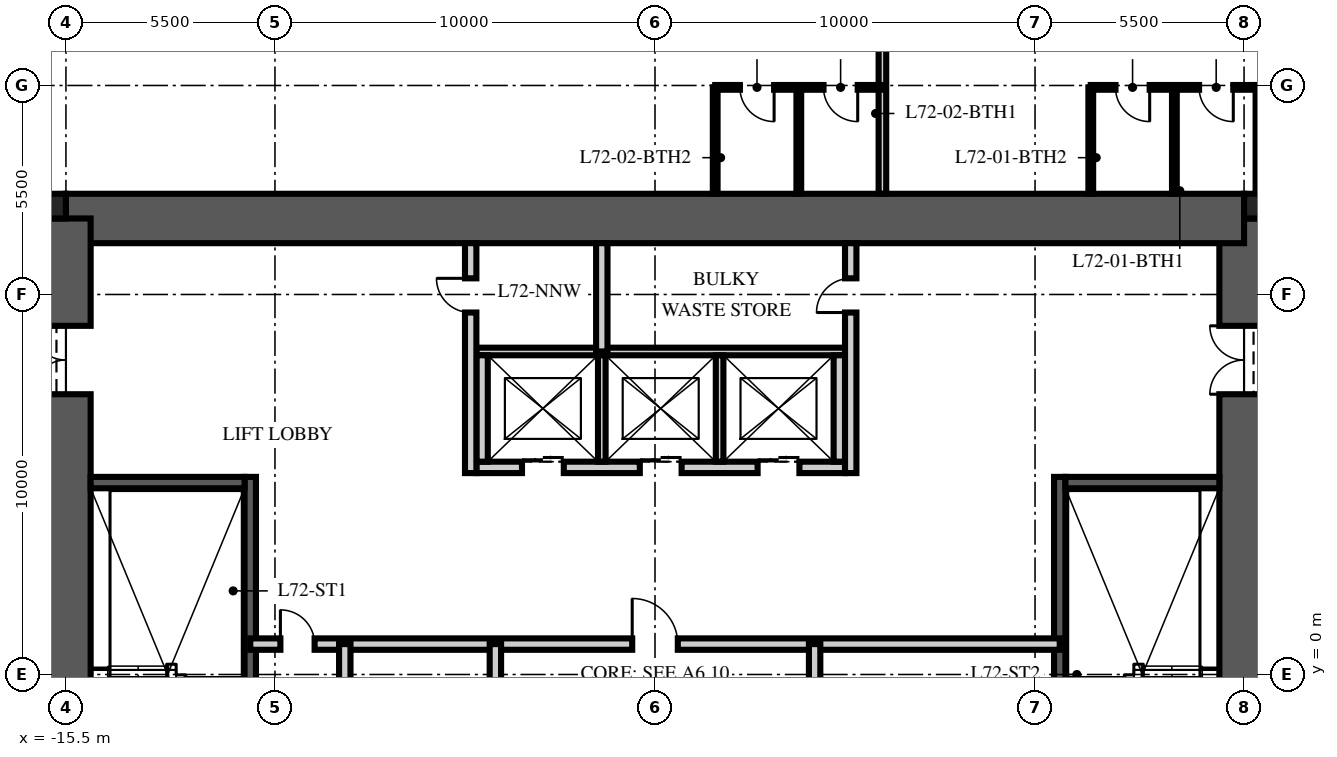
"""IFC4 building model, lengths in metres.
Left out: names, types, materials, properties, quantities, classifications, styles, units other than length and angle.
Written with IfcOpenShell. Run it as: python <this file> out.ifc"""

import sys

from ifc_helpers import new_model, si_unit, direction, frame, frame_2d, origin, origin_2d, place, context, subcontext, project, spatial, rectangle, extrude, element, fill, save


model = new_model("IFC4")
c1 = context("Model", 3, precision=1e-05, world=origin(), true_north=direction((0.0, 1.0)))
c2 = subcontext(c1, "Body", "Model", "MODEL_VIEW")
j1 = project(units=[si_unit("LENGTHUNIT", "METRE"), si_unit("PLANEANGLEUNIT", "RADIAN")], contexts=[c1])
p1 = place(None, origin())
s1 = spatial("IfcSite", under=j1, at=p1, CompositionType="ELEMENT")
p2 = place(p1, origin())
s2 = spatial("IfcBuilding", under=s1, at=p2, CompositionType="ELEMENT")
p3 = place(p2, frame((0.0, 0.0, 289.5)))
s3 = spatial("IfcBuildingStorey", under=s2, at=p3, CompositionType="ELEMENT", Elevation=289.5)
p4 = place(p3, frame((15.5, -12.0, -0.25), z_axis=(0.0, 0.0, 1.0), x_axis=(0.0, 1.0, 0.0)))
e1 = element("IfcWall", 1, at=p4, inside=s3, PredefinedType="SHEAR", context=c2, shape_type="SweptSolid", body=[
    extrude(rectangle(XDim=24.0, YDim=1.3, at=frame_2d((12.0, 0.0))), origin(), (0.0, 0.0, 1.0), 3.75),
])
p5 = place(p4, frame((3.125, 0.0, 0.25)))
e2 = element("IfcOpeningElement", 2, at=p5, cuts=e1, PredefinedType="OPENING", context=c2, shape_type="SweptSolid", body=[
    extrude(rectangle(XDim=1.2, YDim=2.1, at=frame_2d((0.6, 1.05))), frame((0.0, 0.66, 0.0), z_axis=(0.0, -1.0, 0.0), x_axis=(1.0, 0.0, 0.0)), (0.0, 0.0, 1.0), 1.32),
])
p6 = place(p4, frame((19.375, 0.0, 0.25)))
e3 = element("IfcOpeningElement", 3, at=p6, cuts=e1, PredefinedType="OPENING", context=c2, shape_type="SweptSolid", body=[
    extrude(rectangle(XDim=1.8, YDim=2.1, at=frame_2d((0.9, 1.05))), frame((0.0, 0.66, 0.0), z_axis=(0.0, -1.0, 0.0), x_axis=(1.0, 0.0, 0.0)), (0.0, 0.0, 1.0), 1.32),
])
p7 = place(p3, frame((-15.5, 12.0, -0.25), z_axis=(0.0, 0.0, 1.0), x_axis=(1.0, 0.0, 0.0)))
e4 = element("IfcWall", 4, at=p7, inside=s3, PredefinedType="SHEAR", context=c2, shape_type="SweptSolid", body=[
    extrude(rectangle(XDim=31.0, YDim=1.3, at=frame_2d((15.5, 0.0))), origin(), (0.0, 0.0, 1.0), 3.75),
])
p8 = place(p3, frame((-15.5, -12.0, -0.25), z_axis=(0.0, 0.0, 1.0), x_axis=(0.0, 1.0, 0.0)))
e5 = element("IfcWall", 5, at=p8, inside=s3, PredefinedType="SHEAR", context=c2, shape_type="SweptSolid", body=[
    extrude(rectangle(XDim=24.0, YDim=1.3, at=frame_2d((12.0, 0.0))), origin(), (0.0, 0.0, 1.0), 3.75),
])
p9 = place(p8, frame((3.125, 0.0, 0.25)))
e6 = element("IfcOpeningElement", 6, at=p9, cuts=e5, PredefinedType="OPENING", context=c2, shape_type="SweptSolid", body=[
    extrude(rectangle(XDim=1.2, YDim=2.1, at=frame_2d((0.6, 1.05))), frame((0.0, 0.66, 0.0), z_axis=(0.0, -1.0, 0.0), x_axis=(1.0, 0.0, 0.0)), (0.0, 0.0, 1.0), 1.32),
])
p10 = place(p8, frame((19.375, 0.0, 0.25)))
e7 = element("IfcOpeningElement", 7, at=p10, cuts=e5, PredefinedType="OPENING", context=c2, shape_type="SweptSolid", body=[
    extrude(rectangle(XDim=1.8, YDim=2.1, at=frame_2d((0.9, 1.05))), frame((0.0, 0.66, 0.0), z_axis=(0.0, -1.0, 0.0), x_axis=(1.0, 0.0, 0.0)), (0.0, 0.0, 1.0), 1.32),
])
for number, where, z_axis, x_axis in (
    (8, (15.825, 12.325, -0.25), (0.0, 0.0, 1.0), (1.0, 0.0, 0.0)),
    (9, (-15.825, 12.325, -0.25), (0.0, 0.0, 1.0), (1.0, 0.0, 0.0)),
):
    element("IfcColumn", number, at=place(p3, frame(where, z_axis=z_axis, x_axis=x_axis)), inside=s3, PredefinedType="COLUMN", context=c2, shape_type="SweptSolid", body=[
        extrude(rectangle(XDim=0.65, YDim=0.65, at=origin_2d()), origin(), (0.0, 0.0, 1.0), 3.75),
    ])
p11 = place(p3, frame((-10.65, -4.9, 0.0), z_axis=(0.0, 0.0, 1.0), x_axis=(0.0, 1.0, 0.0)))
e10 = element("IfcWall", 10, at=p11, inside=s3, PredefinedType="SOLIDWALL", context=c2, shape_type="SweptSolid", body=[
    extrude(rectangle(XDim=10.1, YDim=0.3, at=frame_2d((5.05, 0.0))), origin(), (0.0, 0.0, 1.0), 3.5),
])
p12 = place(p3, frame((-14.85, 5.05, 0.0), z_axis=(0.0, 0.0, 1.0), x_axis=(1.0, 0.0, 0.0)))
e11 = element("IfcWall", 11, at=p12, inside=s3, PredefinedType="SOLIDWALL", context=c2, shape_type="SweptSolid", body=[
    extrude(rectangle(XDim=4.05, YDim=0.3, at=frame_2d((2.025, 0.0))), origin(), (0.0, 0.0, 1.0), 3.5),
])
p13 = place(p3, frame((10.65, -4.9, 0.0), z_axis=(0.0, 0.0, 1.0), x_axis=(0.0, 1.0, 0.0)))
e12 = element("IfcWall", 12, at=p13, inside=s3, PredefinedType="SOLIDWALL", context=c2, shape_type="SweptSolid", body=[
    extrude(rectangle(XDim=10.1, YDim=0.3, at=frame_2d((5.05, 0.0))), origin(), (0.0, 0.0, 1.0), 3.5),
])
p14 = place(p3, frame((14.85, 5.05, 0.0), z_axis=(0.0, 0.0, 1.0), x_axis=(-1.0, 0.0, 0.0)))
e13 = element("IfcWall", 13, at=p14, inside=s3, PredefinedType="SOLIDWALL", context=c2, shape_type="SweptSolid", body=[
    extrude(rectangle(XDim=4.05, YDim=0.3, at=frame_2d((2.025, 0.0))), origin(), (0.0, 0.0, 1.0), 3.5),
])
p15 = place(p3, frame((-4.7, 5.45, 0.0), z_axis=(0.0, 0.0, 1.0), x_axis=(1.0, 0.0, 0.0)))
e14 = element("IfcWall", 14, at=p15, inside=s3, PredefinedType="PARTITIONING", context=c2, shape_type="SweptSolid", body=[
    extrude(rectangle(XDim=9.7, YDim=0.3, at=frame_2d((4.85, 0.0))), origin(), (0.0, 0.0, 1.0), 3.5),
])
p16 = place(p15, frame((1.2, 0.0, 0.0)))
e15 = element("IfcOpeningElement", 15, at=p16, cuts=e14, PredefinedType="OPENING", context=c2, shape_type="SweptSolid", body=[
    extrude(rectangle(XDim=1.1, YDim=2.1, at=frame_2d((0.55, 1.05))), frame((0.0, 0.16, 0.0), z_axis=(0.0, -1.0, 0.0), x_axis=(1.0, 0.0, 0.0)), (0.0, 0.0, 1.0), 0.32),
])
p17 = place(p15, frame((4.3, 0.0, 0.0)))
e16 = element("IfcOpeningElement", 16, at=p17, cuts=e14, PredefinedType="OPENING", context=c2, shape_type="SweptSolid", body=[
    extrude(rectangle(XDim=1.1, YDim=2.1, at=frame_2d((0.55, 1.05))), frame((0.0, 0.16, 0.0), z_axis=(0.0, -1.0, 0.0), x_axis=(1.0, 0.0, 0.0)), (0.0, 0.0, 1.0), 0.32),
])
p18 = place(p15, frame((7.4, 0.0, 0.0)))
e17 = element("IfcOpeningElement", 17, at=p18, cuts=e14, PredefinedType="OPENING", context=c2, shape_type="SweptSolid", body=[
    extrude(rectangle(XDim=1.1, YDim=2.1, at=frame_2d((0.55, 1.05))), frame((0.0, 0.16, 0.0), z_axis=(0.0, -1.0, 0.0), x_axis=(1.0, 0.0, 0.0)), (0.0, 0.0, 1.0), 0.32),
])
p19 = place(p3, frame((-4.7, 8.5, 0.0), z_axis=(0.0, 0.0, 1.0), x_axis=(1.0, 0.0, 0.0)))
e18 = element("IfcWall", 18, at=p19, inside=s3, PredefinedType="PARTITIONING", context=c2, shape_type="SweptSolid", body=[
    extrude(rectangle(XDim=9.7, YDim=0.2, at=frame_2d((4.85, 0.0))), origin(), (0.0, 0.0, 1.0), 3.5),
])
for number, where, z_axis, x_axis in (
    (19, (-4.55, 5.6, 0.0), (0.0, 0.0, 1.0), (0.0, 1.0, 0.0)),
    (20, (4.85, 5.6, 0.0), (0.0, 0.0, 1.0), (0.0, 1.0, 0.0)),
):
    element("IfcWall", number, at=place(p3, frame(where, z_axis=z_axis, x_axis=x_axis)), inside=s3, PredefinedType="PARTITIONING", context=c2, shape_type="SweptSolid", body=[
        extrude(rectangle(XDim=2.8, YDim=0.3, at=frame_2d((1.4, 0.0))), origin(), (0.0, 0.0, 1.0), 3.5),
    ])
for number, where, z_axis, x_axis in (
    (21, (-1.4, 5.6, 0.0), (0.0, 0.0, 1.0), (0.0, 1.0, 0.0)),
    (22, (1.7, 5.6, 0.0), (0.0, 0.0, 1.0), (0.0, 1.0, 0.0)),
):
    element("IfcWall", number, at=place(p3, frame(where, z_axis=z_axis, x_axis=x_axis)), inside=s3, PredefinedType="PARTITIONING", context=c2, shape_type="SweptSolid", body=[
        extrude(rectangle(XDim=2.8, YDim=0.2, at=frame_2d((1.4, 0.0))), origin(), (0.0, 0.0, 1.0), 3.5),
    ])
p20 = place(p3, frame((-10.65, 0.8, 0.0), z_axis=(0.0, 0.0, 1.0), x_axis=(1.0, 0.0, 0.0)))
e23 = element("IfcWall", 23, at=p20, inside=s3, PredefinedType="PARTITIONING", context=c2, shape_type="SweptSolid", body=[
    extrude(rectangle(XDim=21.3, YDim=0.3, at=frame_2d((10.65, 0.0))), origin(), (0.0, 0.0, 1.0), 3.5),
])
p21 = place(p20, frame((10.05, 0.0, 0.0)))
e24 = element("IfcOpeningElement", 24, at=p21, cuts=e23, PredefinedType="OPENING", context=c2, shape_type="SweptSolid", body=[
    extrude(rectangle(XDim=1.2, YDim=2.1, at=frame_2d((0.6, 1.05))), frame((0.0, 0.16, 0.0), z_axis=(0.0, -1.0, 0.0), x_axis=(1.0, 0.0, 0.0)), (0.0, 0.0, 1.0), 0.32),
])
p22 = place(p20, frame((0.793, 0.0, 0.0)))
e25 = element("IfcOpeningElement", 25, at=p22, cuts=e23, PredefinedType="OPENING", context=c2, shape_type="SweptSolid", body=[
    extrude(rectangle(XDim=0.9, YDim=2.1, at=frame_2d((0.45, 1.05))), frame((0.0, 0.16, 0.0), z_axis=(0.0, -1.0, 0.0), x_axis=(1.0, 0.0, 0.0)), (0.0, 0.0, 1.0), 0.32),
])
p23 = place(p3, frame((-4.2, -6.65, 0.0), z_axis=(0.0, 0.0, 1.0), x_axis=(0.0, 1.0, 0.0)))
e26 = element("IfcWall", 26, at=p23, inside=s3, PredefinedType="PARTITIONING", context=c2, shape_type="SweptSolid", body=[
    extrude(rectangle(XDim=7.45, YDim=0.3, at=frame_2d((3.725, 0.0))), origin(), (0.0, 0.0, 1.0), 3.5),
])
p24 = place(p23, frame((3.275, 0.0, 0.0)))
e27 = element("IfcOpeningElement", 27, at=p24, cuts=e26, PredefinedType="OPENING", context=c2, shape_type="SweptSolid", body=[
    extrude(rectangle(XDim=0.9, YDim=2.1, at=frame_2d((0.45, 1.05))), frame((0.0, 0.16, 0.0), z_axis=(0.0, -1.0, 0.0), x_axis=(1.0, 0.0, 0.0)), (0.0, 0.0, 1.0), 0.32),
])
p25 = place(p3, frame((4.2, -6.65, 0.0), z_axis=(0.0, 0.0, 1.0), x_axis=(0.0, 1.0, 0.0)))
e28 = element("IfcWall", 28, at=p25, inside=s3, PredefinedType="PARTITIONING", context=c2, shape_type="SweptSolid", body=[
    extrude(rectangle(XDim=7.45, YDim=0.3, at=frame_2d((3.725, 0.0))), origin(), (0.0, 0.0, 1.0), 3.5),
])
p26 = place(p25, frame((0.866, 0.0, 0.0)))
e29 = element("IfcOpeningElement", 29, at=p26, cuts=e28, PredefinedType="OPENING", context=c2, shape_type="SweptSolid", body=[
    extrude(rectangle(XDim=0.9, YDim=2.1, at=frame_2d((0.45, 1.05))), frame((0.0, 0.16, 0.0), z_axis=(0.0, -1.0, 0.0), x_axis=(1.0, 0.0, 0.0)), (0.0, 0.0, 1.0), 0.32),
])
p27 = place(p25, frame((4.591, 0.0, 0.0)))
e30 = element("IfcOpeningElement", 30, at=p27, cuts=e28, PredefinedType="OPENING", context=c2, shape_type="SweptSolid", body=[
    extrude(rectangle(XDim=0.9, YDim=2.1, at=frame_2d((0.45, 1.05))), frame((0.0, 0.16, 0.0), z_axis=(0.0, -1.0, 0.0), x_axis=(1.0, 0.0, 0.0)), (0.0, 0.0, 1.0), 0.32),
])
p28 = place(p3, frame((-8.163, -6.65, 0.0), z_axis=(0.0, 0.0, 1.0), x_axis=(0.0, 1.0, 0.0)))
e31 = element("IfcWall", 31, at=p28, inside=s3, PredefinedType="PARTITIONING", context=c2, shape_type="SweptSolid", body=[
    extrude(rectangle(XDim=7.45, YDim=0.3, at=frame_2d((3.725, 0.0))), origin(), (0.0, 0.0, 1.0), 3.5),
])
p29 = place(p3, frame((-4.85, 5.3, 0.0), z_axis=(0.0, 0.0, 1.0), x_axis=(0.0, 1.0, 0.0)))
e32 = element("IfcWall", 32, at=p29, inside=s3, PredefinedType="PARTITIONING", context=c2, shape_type="SweptSolid", body=[
    extrude(rectangle(XDim=6.05, YDim=0.3, at=frame_2d((3.025, 0.0))), origin(), (0.0, 0.0, 1.0), 3.5),
])
p30 = place(p29, frame((4.225, 0.0, 0.0)))
e33 = element("IfcOpeningElement", 33, at=p30, cuts=e32, PredefinedType="OPENING", context=c2, shape_type="SweptSolid", body=[
    extrude(rectangle(XDim=0.9, YDim=2.1, at=frame_2d((0.45, 1.05))), frame((0.0, 0.16, 0.0), z_axis=(0.0, -1.0, 0.0), x_axis=(1.0, 0.0, 0.0)), (0.0, 0.0, 1.0), 0.32),
])
p31 = place(p3, frame((5.15, 5.3, 0.0), z_axis=(0.0, 0.0, 1.0), x_axis=(0.0, 1.0, 0.0)))
e34 = element("IfcWall", 34, at=p31, inside=s3, PredefinedType="PARTITIONING", context=c2, shape_type="SweptSolid", body=[
    extrude(rectangle(XDim=6.05, YDim=0.3, at=frame_2d((3.025, 0.0))), origin(), (0.0, 0.0, 1.0), 3.5),
])
p32 = place(p31, frame((4.225, 0.0, 0.0)))
e35 = element("IfcOpeningElement", 35, at=p32, cuts=e34, PredefinedType="OPENING", context=c2, shape_type="SweptSolid", body=[
    extrude(rectangle(XDim=0.9, YDim=2.1, at=frame_2d((0.45, 1.05))), frame((0.0, 0.16, 0.0), z_axis=(0.0, -1.0, 0.0), x_axis=(1.0, 0.0, 0.0)), (0.0, 0.0, 1.0), 0.32),
])
p33 = place(p3, frame((-1.4, 8.5, 0.0), z_axis=(0.0, 0.0, 1.0), x_axis=(0.0, 1.0, 0.0)))
e36 = element("IfcWall", 36, at=p33, inside=s3, PredefinedType="PARTITIONING", context=c2, shape_type="SweptSolid", body=[
    extrude(rectangle(XDim=2.85, YDim=0.3, at=frame_2d((1.425, 0.0))), origin(), (0.0, 0.0, 1.0), 3.5),
])
p34 = place(p3, frame((5.984, 12.65, 0.0), z_axis=(0.0, 0.0, 1.0), x_axis=(0.0, 1.0, 0.0)))
e37 = element("IfcWall", 37, at=p34, inside=s3, PredefinedType="PARTITIONING", context=c2, shape_type="SweptSolid", body=[
    extrude(rectangle(XDim=11.1, YDim=0.2, at=frame_2d((5.55, 0.0))), origin(), (0.0, 0.0, 1.0), 3.01),
])
p35 = place(p3, frame((15.866, 15.45, 0.0), z_axis=(0.0, 0.0, 1.0), x_axis=(-1.0, 0.0, 0.0)))
e38 = element("IfcWall", 38, at=p35, inside=s3, PredefinedType="PARTITIONING", context=c2, shape_type="SweptSolid", body=[
    extrude(rectangle(XDim=4.4, YDim=0.125, at=frame_2d((2.2, 0.0))), origin(), (0.0, 0.0, 1.0), 2.9),
])
p36 = place(p35, frame((0.65, 0.0, 0.0)))
e39 = element("IfcOpeningElement", 39, at=p36, cuts=e38, PredefinedType="OPENING", context=c2, shape_type="SweptSolid", body=[
    extrude(rectangle(XDim=0.9, YDim=2.1, at=frame_2d((0.45, 1.05))), frame((0.0, 0.073, 0.0), z_axis=(0.0, -1.0, 0.0), x_axis=(1.0, 0.0, 0.0)), (0.0, 0.0, 1.0), 0.145),
])
p37 = place(p35, frame((2.85, 0.0, 0.0)))
e40 = element("IfcOpeningElement", 40, at=p37, cuts=e38, PredefinedType="OPENING", context=c2, shape_type="SweptSolid", body=[
    extrude(rectangle(XDim=0.9, YDim=2.1, at=frame_2d((0.45, 1.05))), frame((0.0, 0.073, 0.0), z_axis=(0.0, -1.0, 0.0), x_axis=(1.0, 0.0, 0.0)), (0.0, 0.0, 1.0), 0.145),
])
p38 = place(p3, frame((15.866, 12.65, 0.0), z_axis=(0.0, 0.0, 1.0), x_axis=(0.0, 1.0, 0.0)))
e41 = element("IfcWall", 41, at=p38, inside=s3, PredefinedType="PARTITIONING", context=c2, shape_type="SweptSolid", body=[
    extrude(rectangle(XDim=2.8, YDim=0.125, at=frame_2d((1.4, 0.0))), origin(), (0.0, 0.0, 1.0), 2.6),
])
for number, where, z_axis, x_axis in (
    (42, (13.667, 12.65, 0.0), (0.0, 0.0, 1.0), (0.0, 1.0, 0.0)),
    (43, (11.467, 12.65, 0.0), (0.0, 0.0, 1.0), (0.0, 1.0, 0.0)),
):
    element("IfcWall", number, at=place(p3, frame(where, z_axis=z_axis, x_axis=x_axis)), inside=s3, PredefinedType="PARTITIONING", context=c2, shape_type="SweptSolid", body=[
        extrude(rectangle(XDim=2.8, YDim=0.125, at=frame_2d((1.4, 0.0))), origin(), (0.0, 0.0, 1.0), 3.5),
    ])
p39 = place(p3, frame((5.984, 15.45, 0.0), z_axis=(0.0, 0.0, 1.0), x_axis=(-1.0, 0.0, 0.0)))
e44 = element("IfcWall", 44, at=p39, inside=s3, PredefinedType="PARTITIONING", context=c2, shape_type="SweptSolid", body=[
    extrude(rectangle(XDim=4.4, YDim=0.125, at=frame_2d((2.2, 0.0))), origin(), (0.0, 0.0, 1.0), 2.91),
])
p40 = place(p39, frame((0.65, 0.0, 0.0)))
e45 = element("IfcOpeningElement", 45, at=p40, cuts=e44, PredefinedType="OPENING", context=c2, shape_type="SweptSolid", body=[
    extrude(rectangle(XDim=0.9, YDim=2.1, at=frame_2d((0.45, 1.05))), frame((0.0, 0.073, 0.0), z_axis=(0.0, -1.0, 0.0), x_axis=(1.0, 0.0, 0.0)), (0.0, 0.0, 1.0), 0.145),
])
p41 = place(p39, frame((2.85, 0.0, 0.0)))
e46 = element("IfcOpeningElement", 46, at=p41, cuts=e44, PredefinedType="OPENING", context=c2, shape_type="SweptSolid", body=[
    extrude(rectangle(XDim=0.9, YDim=2.1, at=frame_2d((0.45, 1.05))), frame((0.0, 0.073, 0.0), z_axis=(0.0, -1.0, 0.0), x_axis=(1.0, 0.0, 0.0)), (0.0, 0.0, 1.0), 0.145),
])
p42 = place(p3, frame((3.784, 12.65, 0.0), z_axis=(0.0, 0.0, 1.0), x_axis=(0.0, 1.0, 0.0)))
e47 = element("IfcWall", 47, at=p42, inside=s3, PredefinedType="PARTITIONING", context=c2, shape_type="SweptSolid", body=[
    extrude(rectangle(XDim=2.8, YDim=0.125, at=frame_2d((1.4, 0.0))), origin(), (0.0, 0.0, 1.0), 2.91),
])
p43 = place(p3, frame((1.584, 12.65, 0.0), z_axis=(0.0, 0.0, 1.0), x_axis=(0.0, 1.0, 0.0)))
e48 = element("IfcWall", 48, at=p43, inside=s3, PredefinedType="PARTITIONING", context=c2, shape_type="SweptSolid", body=[
    extrude(rectangle(XDim=2.8, YDim=0.125, at=frame_2d((1.4, 0.0))), origin(), (0.0, 0.0, 1.0), 3.5),
])
p44 = place(p10, origin())
e49 = element("IfcDoor", 49, at=p44, inside=s3, OperationType="DOUBLE_DOOR_SINGLE_SWING", PredefinedType="DOOR", context=c2, shape_type="SweptSolid", body=[
    extrude(rectangle(XDim=1.8, YDim=2.1, at=frame_2d((0.9, 1.05))), frame((0.0, 0.025, 0.0), z_axis=(0.0, -1.0, 0.0), x_axis=(1.0, 0.0, 0.0)), (0.0, 0.0, 1.0), 0.05),
])
fill(e7, e49)
p45 = place(p6, origin())
e50 = element("IfcDoor", 50, at=p45, inside=s3, OperationType="DOUBLE_DOOR_SINGLE_SWING", PredefinedType="DOOR", context=c2, shape_type="SweptSolid", body=[
    extrude(rectangle(XDim=1.8, YDim=2.1, at=frame_2d((0.9, 1.05))), frame((0.0, 0.025, 0.0), z_axis=(0.0, -1.0, 0.0), x_axis=(1.0, 0.0, 0.0)), (0.0, 0.0, 1.0), 0.05),
])
fill(e3, e50)
p46 = place(p16, origin())
e51 = element("IfcDoor", 51, at=p46, inside=s3, OperationType="DOUBLE_DOOR_SLIDING", PredefinedType="DOOR", context=c2, shape_type="SweptSolid", body=[
    extrude(rectangle(XDim=1.1, YDim=2.1, at=frame_2d((0.55, 1.05))), frame((0.0, 0.025, 0.0), z_axis=(0.0, -1.0, 0.0), x_axis=(1.0, 0.0, 0.0)), (0.0, 0.0, 1.0), 0.05),
])
fill(e15, e51)
p47 = place(p17, origin())
e52 = element("IfcDoor", 52, at=p47, inside=s3, OperationType="DOUBLE_DOOR_SLIDING", PredefinedType="DOOR", context=c2, shape_type="SweptSolid", body=[
    extrude(rectangle(XDim=1.1, YDim=2.1, at=frame_2d((0.55, 1.05))), frame((0.0, 0.025, 0.0), z_axis=(0.0, -1.0, 0.0), x_axis=(1.0, 0.0, 0.0)), (0.0, 0.0, 1.0), 0.05),
])
fill(e16, e52)
p48 = place(p18, origin())
e53 = element("IfcDoor", 53, at=p48, inside=s3, OperationType="DOUBLE_DOOR_SLIDING", PredefinedType="DOOR", context=c2, shape_type="SweptSolid", body=[
    extrude(rectangle(XDim=1.1, YDim=2.1, at=frame_2d((0.55, 1.05))), frame((0.0, 0.025, 0.0), z_axis=(0.0, -1.0, 0.0), x_axis=(1.0, 0.0, 0.0)), (0.0, 0.0, 1.0), 0.05),
])
fill(e17, e53)
p49 = place(p21, origin())
e54 = element("IfcDoor", 54, at=p49, inside=s3, OperationType="SINGLE_SWING_LEFT", PredefinedType="DOOR", context=c2, shape_type="SweptSolid", body=[
    extrude(rectangle(XDim=1.2, YDim=2.1, at=frame_2d((0.6, 1.05))), frame((0.0, 0.025, 0.0), z_axis=(0.0, -1.0, 0.0), x_axis=(1.0, 0.0, 0.0)), (0.0, 0.0, 1.0), 0.05),
])
fill(e24, e54)
p50 = place(p22, origin())
e55 = element("IfcDoor", 55, at=p50, inside=s3, OperationType="SINGLE_SWING_LEFT", PredefinedType="DOOR", context=c2, shape_type="SweptSolid", body=[
    extrude(rectangle(XDim=0.9, YDim=2.1, at=frame_2d((0.45, 1.05))), frame((0.0, 0.025, 0.0), z_axis=(0.0, -1.0, 0.0), x_axis=(1.0, 0.0, 0.0)), (0.0, 0.0, 1.0), 0.05),
])
fill(e25, e55)
p51 = place(p30, origin())
e56 = element("IfcDoor", 56, at=p51, inside=s3, OperationType="SINGLE_SWING_RIGHT", PredefinedType="DOOR", context=c2, shape_type="SweptSolid", body=[
    extrude(rectangle(XDim=0.9, YDim=2.1, at=frame_2d((0.45, 1.05))), frame((0.0, 0.025, 0.0), z_axis=(0.0, -1.0, 0.0), x_axis=(1.0, 0.0, 0.0)), (0.0, 0.0, 1.0), 0.05),
])
fill(e33, e56)
p52 = place(p32, origin())
e57 = element("IfcDoor", 57, at=p52, inside=s3, OperationType="SINGLE_SWING_LEFT", PredefinedType="DOOR", context=c2, shape_type="SweptSolid", body=[
    extrude(rectangle(XDim=0.9, YDim=2.1, at=frame_2d((0.45, 1.05))), frame((0.0, 0.025, 0.0), z_axis=(0.0, -1.0, 0.0), x_axis=(1.0, 0.0, 0.0)), (0.0, 0.0, 1.0), 0.05),
])
fill(e35, e57)
p53 = place(p36, origin())
e58 = element("IfcDoor", 58, at=p53, inside=s3, OperationType="SINGLE_SWING_LEFT", PredefinedType="DOOR", context=c2, shape_type="SweptSolid", body=[
    extrude(rectangle(XDim=0.9, YDim=2.1, at=frame_2d((0.45, 1.05))), frame((0.0, 0.025, 0.0), z_axis=(0.0, -1.0, 0.0), x_axis=(1.0, 0.0, 0.0)), (0.0, 0.0, 1.0), 0.05),
])
fill(e39, e58)
p54 = place(p37, origin())
e59 = element("IfcDoor", 59, at=p54, inside=s3, OperationType="SINGLE_SWING_LEFT", PredefinedType="DOOR", context=c2, shape_type="SweptSolid", body=[
    extrude(rectangle(XDim=0.9, YDim=2.1, at=frame_2d((0.45, 1.05))), frame((0.0, 0.025, 0.0), z_axis=(0.0, -1.0, 0.0), x_axis=(1.0, 0.0, 0.0)), (0.0, 0.0, 1.0), 0.05),
])
fill(e40, e59)
p55 = place(p40, origin())
e60 = element("IfcDoor", 60, at=p55, inside=s3, OperationType="SINGLE_SWING_LEFT", PredefinedType="DOOR", context=c2, shape_type="SweptSolid", body=[
    extrude(rectangle(XDim=0.9, YDim=2.1, at=frame_2d((0.45, 1.05))), frame((0.0, 0.025, 0.0), z_axis=(0.0, -1.0, 0.0), x_axis=(1.0, 0.0, 0.0)), (0.0, 0.0, 1.0), 0.05),
])
fill(e45, e60)
p56 = place(p41, origin())
e61 = element("IfcDoor", 61, at=p56, inside=s3, OperationType="SINGLE_SWING_LEFT", PredefinedType="DOOR", context=c2, shape_type="SweptSolid", body=[
    extrude(rectangle(XDim=0.9, YDim=2.1, at=frame_2d((0.45, 1.05))), frame((0.0, 0.025, 0.0), z_axis=(0.0, -1.0, 0.0), x_axis=(1.0, 0.0, 0.0)), (0.0, 0.0, 1.0), 0.05),
])
fill(e46, e61)
save(model, sys.argv[1])
